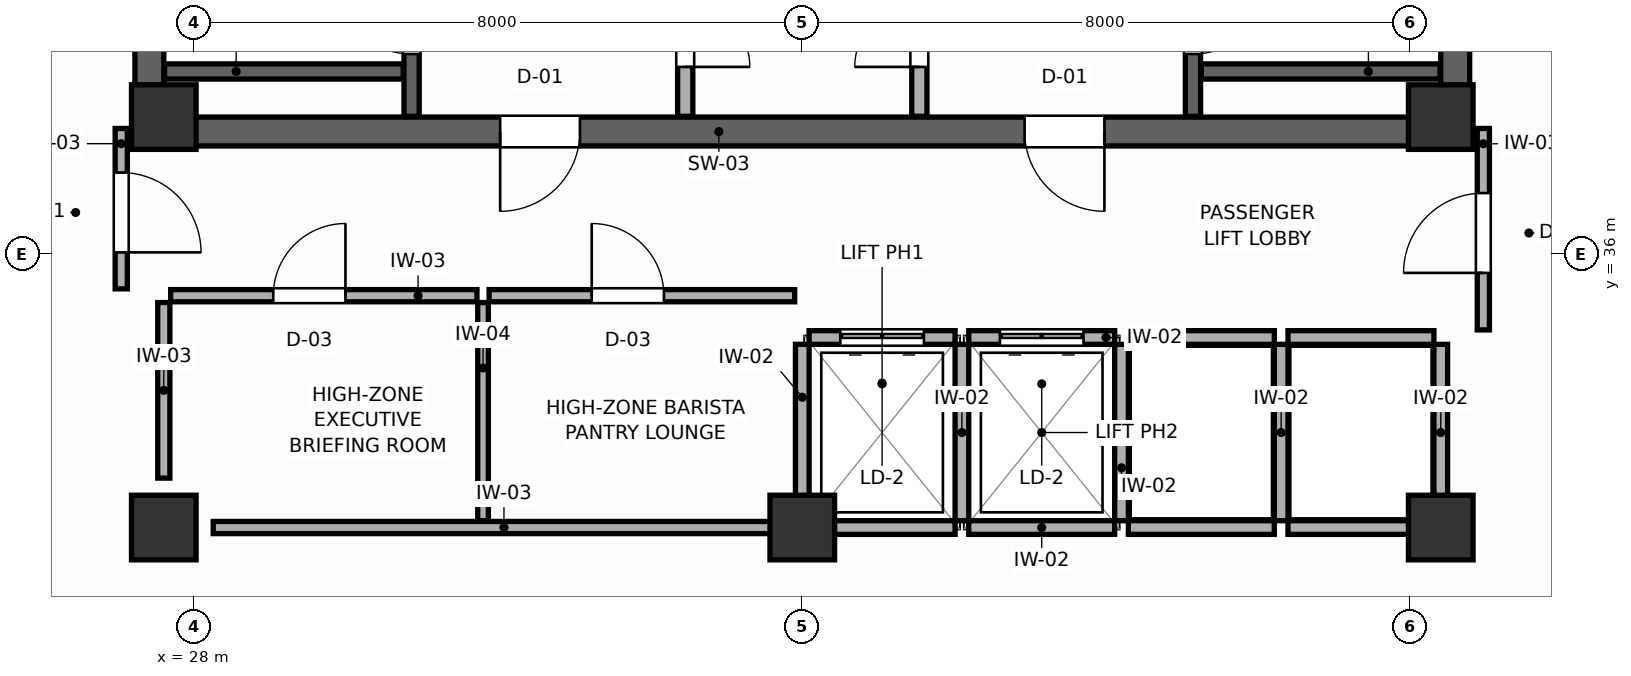
"""IFC4 building model, lengths in metres.
Left out: names, types, materials, properties, quantities, classifications, styles, units other than length and angle.
Written with IfcOpenShell. Run it as: python <this file> out.ifc"""

import sys

from ifc_helpers import new_model, si_unit, direction, frame, frame_2d, origin, origin_2d, place, context, subcontext, project, spatial, rectangle, extrude, source, transform, mapped, element, fill, save


model = new_model("IFC4")
c1 = context("Model", 3, precision=1e-05, world=origin(), true_north=direction((0.0, 1.0)))
c2 = subcontext(c1, "Body", "Model", "MODEL_VIEW")
j1 = project(units=[si_unit("LENGTHUNIT", "METRE"), si_unit("PLANEANGLEUNIT", "RADIAN")], contexts=[c1])
p1 = place(None, origin())
s1 = spatial("IfcSite", under=j1, at=p1, CompositionType="ELEMENT")
p2 = place(p1, origin())
s2 = spatial("IfcBuilding", under=s1, at=p2, CompositionType="ELEMENT")
p3 = place(p2, frame((0.0, 0.0, 243.0)))
s3 = spatial("IfcBuildingStorey", under=s2, at=p3, CompositionType="ELEMENT", Elevation=243.0)
p4 = place(p3, frame((27.22, 37.61, 0.0), z_axis=(0.0, 0.0, 1.0), x_axis=(1.0, 0.0, 0.0)))
e1 = element("IfcWall", 1, at=p4, inside=s3, PredefinedType="SHEAR", context=c2, shape_type="SweptSolid", body=[
    extrude(rectangle(XDim=17.56, YDim=0.38, at=frame_2d((8.78, 0.0))), origin(), (0.0, 0.0, 1.0), 3.6),
])
p5 = place(p4, frame((4.805, 0.0, 0.0)))
e2 = element("IfcOpeningElement", 2, at=p5, cuts=e1, PredefinedType="OPENING", context=c2, shape_type="SweptSolid", body=[
    extrude(rectangle(XDim=1.05, YDim=2.1, at=frame_2d((0.525, 1.05))), frame((0.0, 0.2, 0.0), z_axis=(0.0, -1.0, 0.0), x_axis=(1.0, 0.0, 0.0)), (0.0, 0.0, 1.0), 0.4),
])
p6 = place(p4, frame((11.705, 0.0, 0.0)))
e3 = element("IfcOpeningElement", 3, at=p6, cuts=e1, PredefinedType="OPENING", context=c2, shape_type="SweptSolid", body=[
    extrude(rectangle(XDim=1.05, YDim=2.1, at=frame_2d((0.525, 1.05))), frame((0.0, 0.2, 0.0), z_axis=(0.0, -1.0, 0.0), x_axis=(1.0, 0.0, 0.0)), (0.0, 0.0, 1.0), 0.4),
])
for number, where, z_axis, x_axis in (
    (4, (27.41, 37.8, 0.0), (0.0, 0.0, 1.0), (0.0, 1.0, 0.0)),
    (5, (44.59, 37.8, 0.0), (0.0, 0.0, 1.0), (0.0, 1.0, 0.0)),
):
    element("IfcWall", number, at=place(p3, frame(where, z_axis=z_axis, x_axis=x_axis)), inside=s3, PredefinedType="SHEAR", context=c2, shape_type="SweptSolid", body=[
        extrude(rectangle(XDim=9.0, YDim=0.38, at=frame_2d((4.5, 0.0))), origin(), (0.0, 0.0, 1.0), 3.6),
    ])
m1 = source(origin(), c2, "Body", "SweptSolid", [
    extrude(rectangle(XDim=0.85, YDim=0.85, at=origin_2d()), origin(), (0.0, 0.0, 1.0), 3.6),
])
for number, where, z_axis, x_axis in (
    (6, (27.6, 37.8, 0.0), (0.0, 0.0, 1.0), (1.0, 0.0, 0.0)),
    (7, (44.4, 37.8, 0.0), (0.0, 0.0, 1.0), (1.0, 0.0, 0.0)),
    (8, (27.6, 32.4, 0.0), (0.0, 0.0, 1.0), (1.0, 0.0, 0.0)),
    (9, (44.4, 32.4, 0.0), (0.0, 0.0, 1.0), (1.0, 0.0, 0.0)),
    (10, (36.0, 32.4, 0.0), (0.0, 0.0, 1.0), (1.0, 0.0, 0.0)),
):
    element("IfcColumn", number, at=place(p3, frame(where, z_axis=z_axis, x_axis=x_axis)), inside=s3, PredefinedType="COLUMN", context=c2, shape_type="MappedRepresentation", body=[
        mapped(m1, transform((0.0, 0.0, 0.0), scale=1.0)),
    ])
p7 = place(p3, frame((30.86, 37.81, 0.0), z_axis=(0.0, 0.0, 1.0), x_axis=(0.0, 1.0, 0.0)))
e11 = element("IfcWall", 11, at=p7, inside=s3, PredefinedType="SHEAR", context=c2, shape_type="SweptSolid", body=[
    extrude(rectangle(XDim=8.98, YDim=0.2, at=frame_2d((4.49, 0.0))), origin(), (0.0, 0.0, 1.0), 3.6),
])
p8 = place(p7, frame((0.82, 0.0, 0.0)))
e12 = element("IfcOpeningElement", 12, at=p8, cuts=e11, PredefinedType="OPENING", context=c2, shape_type="SweptSolid", body=[
    extrude(rectangle(XDim=1.05, YDim=2.1, at=frame_2d((0.525, 1.05))), frame((0.0, 0.11, 0.0), z_axis=(0.0, -1.0, 0.0), x_axis=(1.0, 0.0, 0.0)), (0.0, 0.0, 1.0), 0.22),
])
p9 = place(p3, frame((27.61, 38.4, 0.0), z_axis=(0.0, 0.0, 1.0), x_axis=(1.0, 0.0, 0.0)))
e13 = element("IfcWall", 13, at=p9, inside=s3, PredefinedType="SHEAR", context=c2, shape_type="SweptSolid", body=[
    extrude(rectangle(XDim=3.14, YDim=0.2, at=frame_2d((1.57, 0.0))), origin(), (0.0, 0.0, 1.0), 3.6),
])
p10 = place(p3, frame((41.14, 37.81, 0.0), z_axis=(0.0, 0.0, 1.0), x_axis=(0.0, 1.0, 0.0)))
e14 = element("IfcWall", 14, at=p10, inside=s3, PredefinedType="SHEAR", context=c2, shape_type="SweptSolid", body=[
    extrude(rectangle(XDim=8.98, YDim=0.2, at=frame_2d((4.49, 0.0))), origin(), (0.0, 0.0, 1.0), 3.6),
])
p11 = place(p10, frame((0.82, 0.0, 0.0)))
e15 = element("IfcOpeningElement", 15, at=p11, cuts=e14, PredefinedType="OPENING", context=c2, shape_type="SweptSolid", body=[
    extrude(rectangle(XDim=1.05, YDim=2.1, at=frame_2d((0.525, 1.05))), frame((0.0, 0.11, 0.0), z_axis=(0.0, -1.0, 0.0), x_axis=(1.0, 0.0, 0.0)), (0.0, 0.0, 1.0), 0.22),
])
p12 = place(p3, frame((41.25, 38.4, 0.0), z_axis=(0.0, 0.0, 1.0), x_axis=(1.0, 0.0, 0.0)))
e16 = element("IfcWall", 16, at=p12, inside=s3, PredefinedType="SHEAR", context=c2, shape_type="SweptSolid", body=[
    extrude(rectangle(XDim=3.14, YDim=0.2, at=frame_2d((1.57, 0.0))), origin(), (0.0, 0.0, 1.0), 3.6),
])
p13 = place(p3, frame((34.46, 37.81, 0.0), z_axis=(0.0, 0.0, 1.0), x_axis=(0.0, 1.0, 0.0)))
e17 = element("IfcWall", 17, at=p13, inside=s3, PredefinedType="PARTITIONING", context=c2, shape_type="SweptSolid", body=[
    extrude(rectangle(XDim=8.98, YDim=0.2, at=frame_2d((4.49, 0.0))), origin(), (0.0, 0.0, 1.0), 3.41),
])
p14 = place(p13, frame((0.65, 0.0, 0.0)))
e18 = element("IfcOpeningElement", 18, at=p14, cuts=e17, PredefinedType="OPENING", context=c2, shape_type="SweptSolid", body=[
    extrude(rectangle(XDim=0.85, YDim=2.05, at=frame_2d((0.425, 1.025))), frame((0.0, 0.11, 0.0), z_axis=(0.0, -1.0, 0.0), x_axis=(1.0, 0.0, 0.0)), (0.0, 0.0, 1.0), 0.22),
])
p15 = place(p3, frame((37.54, 37.81, 0.0), z_axis=(0.0, 0.0, 1.0), x_axis=(0.0, 1.0, 0.0)))
e19 = element("IfcWall", 19, at=p15, inside=s3, PredefinedType="PARTITIONING", context=c2, shape_type="SweptSolid", body=[
    extrude(rectangle(XDim=8.98, YDim=0.2, at=frame_2d((4.49, 0.0))), origin(), (0.0, 0.0, 1.0), 3.41),
])
p16 = place(p15, frame((0.65, 0.0, 0.0)))
e20 = element("IfcOpeningElement", 20, at=p16, cuts=e19, PredefinedType="OPENING", context=c2, shape_type="SweptSolid", body=[
    extrude(rectangle(XDim=0.85, YDim=2.05, at=frame_2d((0.425, 1.025))), frame((0.0, 0.11, 0.0), z_axis=(0.0, -1.0, 0.0), x_axis=(1.0, 0.0, 0.0)), (0.0, 0.0, 1.0), 0.22),
])
p17 = place(p3, frame((36.09, 34.9, 0.0), z_axis=(0.0, 0.0, 1.0), x_axis=(1.0, 0.0, 0.0)))
e21 = element("IfcWall", 21, at=p17, inside=s3, PredefinedType="PARTITIONING", context=c2, shape_type="SweptSolid", body=[
    extrude(rectangle(XDim=1.92, YDim=0.18, at=frame_2d((0.96, 0.0))), origin(), (0.0, 0.0, 1.0), 3.41),
])
p18 = place(p17, frame((0.41, 0.0, 0.0)))
e22 = element("IfcOpeningElement", 22, at=p18, cuts=e21, PredefinedType="OPENING", context=c2, shape_type="SweptSolid", body=[
    extrude(rectangle(XDim=1.1, YDim=2.1, at=frame_2d((0.55, 1.05))), frame((0.0, 0.1, 0.0), z_axis=(0.0, -1.0, 0.0), x_axis=(1.0, 0.0, 0.0)), (0.0, 0.0, 1.0), 0.2),
])
p19 = place(p3, frame((36.09, 32.4, 0.0), z_axis=(0.0, 0.0, 1.0), x_axis=(1.0, 0.0, 0.0)))
e23 = element("IfcWall", 23, at=p19, inside=s3, PredefinedType="PARTITIONING", context=c2, shape_type="SweptSolid", body=[
    extrude(rectangle(XDim=1.92, YDim=0.18, at=frame_2d((0.96, 0.0))), origin(), (0.0, 0.0, 1.0), 3.08),
])
p20 = place(p3, frame((36.0, 32.49, 0.0), z_axis=(0.0, 0.0, 1.0), x_axis=(0.0, 1.0, 0.0)))
e24 = element("IfcWall", 24, at=p20, inside=s3, PredefinedType="PARTITIONING", context=c2, shape_type="SweptSolid", body=[
    extrude(rectangle(XDim=2.32, YDim=0.18, at=frame_2d((1.16, 0.0))), origin(), (0.0, 0.0, 1.0), 3.41),
])
p21 = place(p3, frame((38.19, 34.9, 0.0), z_axis=(0.0, 0.0, 1.0), x_axis=(1.0, 0.0, 0.0)))
e25 = element("IfcWall", 25, at=p21, inside=s3, PredefinedType="PARTITIONING", context=c2, shape_type="SweptSolid", body=[
    extrude(rectangle(XDim=1.92, YDim=0.18, at=frame_2d((0.96, 0.0))), origin(), (0.0, 0.0, 1.0), 3.41),
])
p22 = place(p21, frame((0.41, 0.0, 0.0)))
e26 = element("IfcOpeningElement", 26, at=p22, cuts=e25, PredefinedType="OPENING", context=c2, shape_type="SweptSolid", body=[
    extrude(rectangle(XDim=1.1, YDim=2.1, at=frame_2d((0.55, 1.05))), frame((0.0, 0.1, 0.0), z_axis=(0.0, -1.0, 0.0), x_axis=(1.0, 0.0, 0.0)), (0.0, 0.0, 1.0), 0.2),
])
p23 = place(p3, frame((38.19, 32.4, 0.0), z_axis=(0.0, 0.0, 1.0), x_axis=(1.0, 0.0, 0.0)))
e27 = element("IfcWall", 27, at=p23, inside=s3, PredefinedType="PARTITIONING", context=c2, shape_type="SweptSolid", body=[
    extrude(rectangle(XDim=1.92, YDim=0.18, at=frame_2d((0.96, 0.0))), origin(), (0.0, 0.0, 1.0), 3.08),
])
p24 = place(p3, frame((38.1, 32.49, 0.0), z_axis=(0.0, 0.0, 1.0), x_axis=(0.0, 1.0, 0.0)))
e28 = element("IfcWall", 28, at=p24, inside=s3, PredefinedType="PARTITIONING", context=c2, shape_type="SweptSolid", body=[
    extrude(rectangle(XDim=2.32, YDim=0.18, at=frame_2d((1.16, 0.0))), origin(), (0.0, 0.0, 1.0), 3.41),
])
p25 = place(p3, frame((40.29, 34.9, 0.0), z_axis=(0.0, 0.0, 1.0), x_axis=(1.0, 0.0, 0.0)))
e29 = element("IfcWall", 29, at=p25, inside=s3, PredefinedType="PARTITIONING", context=c2, shape_type="SweptSolid", body=[
    extrude(rectangle(XDim=1.92, YDim=0.18, at=frame_2d((0.96, 0.0))), origin(), (0.0, 0.0, 1.0), 3.41),
])
p26 = place(p3, frame((40.29, 32.4, 0.0), z_axis=(0.0, 0.0, 1.0), x_axis=(1.0, 0.0, 0.0)))
e30 = element("IfcWall", 30, at=p26, inside=s3, PredefinedType="PARTITIONING", context=c2, shape_type="SweptSolid", body=[
    extrude(rectangle(XDim=1.92, YDim=0.18, at=frame_2d((0.96, 0.0))), origin(), (0.0, 0.0, 1.0), 3.08),
])
p27 = place(p3, frame((40.2, 32.49, 0.0), z_axis=(0.0, 0.0, 1.0), x_axis=(0.0, 1.0, 0.0)))
e31 = element("IfcWall", 31, at=p27, inside=s3, PredefinedType="PARTITIONING", context=c2, shape_type="SweptSolid", body=[
    extrude(rectangle(XDim=2.32, YDim=0.18, at=frame_2d((1.16, 0.0))), origin(), (0.0, 0.0, 1.0), 3.41),
])
p28 = place(p3, frame((42.39, 34.9, 0.0), z_axis=(0.0, 0.0, 1.0), x_axis=(1.0, 0.0, 0.0)))
e32 = element("IfcWall", 32, at=p28, inside=s3, PredefinedType="PARTITIONING", context=c2, shape_type="SweptSolid", body=[
    extrude(rectangle(XDim=1.92, YDim=0.18, at=frame_2d((0.96, 0.0))), origin(), (0.0, 0.0, 1.0), 3.41),
])
p29 = place(p3, frame((42.39, 32.4, 0.0), z_axis=(0.0, 0.0, 1.0), x_axis=(1.0, 0.0, 0.0)))
e33 = element("IfcWall", 33, at=p29, inside=s3, PredefinedType="PARTITIONING", context=c2, shape_type="SweptSolid", body=[
    extrude(rectangle(XDim=1.92, YDim=0.18, at=frame_2d((0.96, 0.0))), origin(), (0.0, 0.0, 1.0), 3.08),
])
for number, where, z_axis, x_axis in (
    (34, (42.3, 32.49, 0.0), (0.0, 0.0, 1.0), (0.0, 1.0, 0.0)),
    (35, (44.4, 32.49, 0.0), (0.0, 0.0, 1.0), (0.0, 1.0, 0.0)),
):
    element("IfcWall", number, at=place(p3, frame(where, z_axis=z_axis, x_axis=x_axis)), inside=s3, PredefinedType="PARTITIONING", context=c2, shape_type="SweptSolid", body=[
        extrude(rectangle(XDim=2.32, YDim=0.18, at=frame_2d((1.16, 0.0))), origin(), (0.0, 0.0, 1.0), 3.41),
    ])
p30 = place(p3, frame((28.25, 32.4, 0.0), z_axis=(0.0, 0.0, 1.0), x_axis=(1.0, 0.0, 0.0)))
e36 = element("IfcWall", 36, at=p30, inside=s3, PredefinedType="PARTITIONING", context=c2, shape_type="SweptSolid", body=[
    extrude(rectangle(XDim=7.65, YDim=0.16, at=frame_2d((3.825, 0.0))), origin(), (0.0, 0.0, 1.0), 3.08),
])
p31 = place(p3, frame((27.6, 33.05, 0.0), z_axis=(0.0, 0.0, 1.0), x_axis=(0.0, 1.0, 0.0)))
e37 = element("IfcWall", 37, at=p31, inside=s3, PredefinedType="PARTITIONING", context=c2, shape_type="SweptSolid", body=[
    extrude(rectangle(XDim=2.31, YDim=0.16, at=frame_2d((1.155, 0.0))), origin(), (0.0, 0.0, 1.0), 3.41),
])
p32 = place(p3, frame((31.8, 32.49, 0.0), z_axis=(0.0, 0.0, 1.0), x_axis=(0.0, 1.0, 0.0)))
e38 = element("IfcWall", 38, at=p32, inside=s3, PredefinedType="PARTITIONING", context=c2, shape_type="SweptSolid", body=[
    extrude(rectangle(XDim=2.87, YDim=0.14, at=frame_2d((1.435, 0.0))), origin(), (0.0, 0.0, 1.0), 3.41),
])
p33 = place(p3, frame((27.69, 35.45, 0.0), z_axis=(0.0, 0.0, 1.0), x_axis=(1.0, 0.0, 0.0)))
e39 = element("IfcWall", 39, at=p33, inside=s3, PredefinedType="PARTITIONING", context=c2, shape_type="SweptSolid", body=[
    extrude(rectangle(XDim=4.03, YDim=0.16, at=frame_2d((2.015, 0.0))), origin(), (0.0, 0.0, 1.0), 3.41),
])
p34 = place(p33, frame((1.35, 0.0, 0.0)))
e40 = element("IfcOpeningElement", 40, at=p34, cuts=e39, PredefinedType="OPENING", context=c2, shape_type="SweptSolid", body=[
    extrude(rectangle(XDim=0.95, YDim=2.05, at=frame_2d((0.475, 1.025))), frame((0.0, 0.09, 0.0), z_axis=(0.0, -1.0, 0.0), x_axis=(1.0, 0.0, 0.0)), (0.0, 0.0, 1.0), 0.18),
])
p35 = place(p3, frame((31.88, 35.45, 0.0), z_axis=(0.0, 0.0, 1.0), x_axis=(1.0, 0.0, 0.0)))
e41 = element("IfcWall", 41, at=p35, inside=s3, PredefinedType="PARTITIONING", context=c2, shape_type="SweptSolid", body=[
    extrude(rectangle(XDim=4.02, YDim=0.16, at=frame_2d((2.01, 0.0))), origin(), (0.0, 0.0, 1.0), 3.41),
])
p36 = place(p35, frame((1.35, 0.0, 0.0)))
e42 = element("IfcOpeningElement", 42, at=p36, cuts=e41, PredefinedType="OPENING", context=c2, shape_type="SweptSolid", body=[
    extrude(rectangle(XDim=0.95, YDim=2.05, at=frame_2d((0.475, 1.025))), frame((0.0, 0.09, 0.0), z_axis=(0.0, -1.0, 0.0), x_axis=(1.0, 0.0, 0.0)), (0.0, 0.0, 1.0), 0.18),
])
p37 = place(p3, frame((27.04, 35.54, 0.0), z_axis=(0.0, 0.0, 1.0), x_axis=(0.0, 1.0, 0.0)))
e43 = element("IfcWall", 43, at=p37, inside=s3, PredefinedType="PARTITIONING", context=c2, shape_type="SweptSolid", body=[
    extrude(rectangle(XDim=2.11, YDim=0.16, at=frame_2d((1.055, 0.0))), origin(), (0.0, 0.0, 1.0), 3.41),
])
p38 = place(p37, frame((0.48, 0.0, 0.0)))
e44 = element("IfcOpeningElement", 44, at=p38, cuts=e43, PredefinedType="OPENING", context=c2, shape_type="SweptSolid", body=[
    extrude(rectangle(XDim=1.05, YDim=2.1, at=frame_2d((0.525, 1.05))), frame((0.0, 0.09, 0.0), z_axis=(0.0, -1.0, 0.0), x_axis=(1.0, 0.0, 0.0)), (0.0, 0.0, 1.0), 0.18),
])
p39 = place(p3, frame((44.96, 35.0, 0.0), z_axis=(0.0, 0.0, 1.0), x_axis=(0.0, 1.0, 0.0)))
e45 = element("IfcWall", 45, at=p39, inside=s3, PredefinedType="PARTITIONING", context=c2, shape_type="SweptSolid", body=[
    extrude(rectangle(XDim=2.65, YDim=0.16, at=frame_2d((1.325, 0.0))), origin(), (0.0, 0.0, 1.0), 3.41),
])
p40 = place(p39, frame((0.75, 0.0, 0.0)))
e46 = element("IfcOpeningElement", 46, at=p40, cuts=e45, PredefinedType="OPENING", context=c2, shape_type="SweptSolid", body=[
    extrude(rectangle(XDim=1.05, YDim=2.1, at=frame_2d((0.525, 1.05))), frame((0.0, 0.09, 0.0), z_axis=(0.0, -1.0, 0.0), x_axis=(1.0, 0.0, 0.0)), (0.0, 0.0, 1.0), 0.18),
])
p41 = place(p8, origin())
e47 = element("IfcDoor", 47, at=p41, inside=s3, OperationType="SINGLE_SWING_RIGHT", PredefinedType="DOOR", context=c2, shape_type="SweptSolid", body=[
    extrude(rectangle(XDim=1.05, YDim=2.1, at=frame_2d((0.525, 1.05))), frame((0.0, 0.025, 0.0), z_axis=(0.0, -1.0, 0.0), x_axis=(1.0, 0.0, 0.0)), (0.0, 0.0, 1.0), 0.05),
])
fill(e12, e47)
p42 = place(p11, frame((1.05, 0.0, 0.0), z_axis=(0.0, 0.0, 1.0), x_axis=(-1.0, 0.0, 0.0)))
e48 = element("IfcDoor", 48, at=p42, inside=s3, OperationType="SINGLE_SWING_LEFT", PredefinedType="DOOR", context=c2, shape_type="SweptSolid", body=[
    extrude(rectangle(XDim=1.05, YDim=2.1, at=frame_2d((0.525, 1.05))), frame((0.0, 0.025, 0.0), z_axis=(0.0, -1.0, 0.0), x_axis=(1.0, 0.0, 0.0)), (0.0, 0.0, 1.0), 0.05),
])
fill(e15, e48)
p43 = place(p14, frame((0.85, 0.0, 0.0), z_axis=(0.0, 0.0, 1.0), x_axis=(-1.0, 0.0, 0.0)))
e49 = element("IfcDoor", 49, at=p43, inside=s3, OperationType="SINGLE_SWING_RIGHT", PredefinedType="DOOR", context=c2, shape_type="SweptSolid", body=[
    extrude(rectangle(XDim=0.85, YDim=2.05, at=frame_2d((0.425, 1.025))), frame((0.0, 0.025, 0.0), z_axis=(0.0, -1.0, 0.0), x_axis=(1.0, 0.0, 0.0)), (0.0, 0.0, 1.0), 0.05),
])
fill(e18, e49)
p44 = place(p16, origin())
e50 = element("IfcDoor", 50, at=p44, inside=s3, OperationType="SINGLE_SWING_LEFT", PredefinedType="DOOR", context=c2, shape_type="SweptSolid", body=[
    extrude(rectangle(XDim=0.85, YDim=2.05, at=frame_2d((0.425, 1.025))), frame((0.0, 0.025, 0.0), z_axis=(0.0, -1.0, 0.0), x_axis=(1.0, 0.0, 0.0)), (0.0, 0.0, 1.0), 0.05),
])
fill(e20, e50)
p45 = place(p18, origin())
e51 = element("IfcDoor", 51, at=p45, inside=s3, OperationType="DOUBLE_DOOR_SLIDING", PredefinedType="DOOR", context=c2, shape_type="SweptSolid", body=[
    extrude(rectangle(XDim=1.1, YDim=2.1, at=frame_2d((0.55, 1.05))), frame((0.0, 0.025, 0.0), z_axis=(0.0, -1.0, 0.0), x_axis=(1.0, 0.0, 0.0)), (0.0, 0.0, 1.0), 0.05),
])
fill(e22, e51)
p46 = place(p22, origin())
e52 = element("IfcDoor", 52, at=p46, inside=s3, OperationType="DOUBLE_DOOR_SLIDING", PredefinedType="DOOR", context=c2, shape_type="SweptSolid", body=[
    extrude(rectangle(XDim=1.1, YDim=2.1, at=frame_2d((0.55, 1.05))), frame((0.0, 0.025, 0.0), z_axis=(0.0, -1.0, 0.0), x_axis=(1.0, 0.0, 0.0)), (0.0, 0.0, 1.0), 0.05),
])
fill(e26, e52)
p47 = place(p34, origin())
e53 = element("IfcDoor", 53, at=p47, inside=s3, OperationType="SINGLE_SWING_RIGHT", PredefinedType="DOOR", context=c2, shape_type="SweptSolid", body=[
    extrude(rectangle(XDim=0.95, YDim=2.05, at=frame_2d((0.475, 1.025))), frame((0.0, 0.025, 0.0), z_axis=(0.0, -1.0, 0.0), x_axis=(1.0, 0.0, 0.0)), (0.0, 0.0, 1.0), 0.05),
])
fill(e40, e53)
p48 = place(p36, origin())
e54 = element("IfcDoor", 54, at=p48, inside=s3, OperationType="SINGLE_SWING_LEFT", PredefinedType="DOOR", context=c2, shape_type="SweptSolid", body=[
    extrude(rectangle(XDim=0.95, YDim=2.05, at=frame_2d((0.475, 1.025))), frame((0.0, 0.025, 0.0), z_axis=(0.0, -1.0, 0.0), x_axis=(1.0, 0.0, 0.0)), (0.0, 0.0, 1.0), 0.05),
])
fill(e42, e54)
p49 = place(p38, frame((1.05, 0.0, 0.0), z_axis=(0.0, 0.0, 1.0), x_axis=(-1.0, 0.0, 0.0)))
e55 = element("IfcDoor", 55, at=p49, inside=s3, OperationType="SINGLE_SWING_RIGHT", PredefinedType="DOOR", context=c2, shape_type="SweptSolid", body=[
    extrude(rectangle(XDim=1.05, YDim=2.1, at=frame_2d((0.525, 1.05))), frame((0.0, 0.025, 0.0), z_axis=(0.0, -1.0, 0.0), x_axis=(1.0, 0.0, 0.0)), (0.0, 0.0, 1.0), 0.05),
])
fill(e44, e55)
p50 = place(p40, origin())
e56 = element("IfcDoor", 56, at=p50, inside=s3, OperationType="SINGLE_SWING_LEFT", PredefinedType="DOOR", context=c2, shape_type="SweptSolid", body=[
    extrude(rectangle(XDim=1.05, YDim=2.1, at=frame_2d((0.525, 1.05))), frame((0.0, 0.025, 0.0), z_axis=(0.0, -1.0, 0.0), x_axis=(1.0, 0.0, 0.0)), (0.0, 0.0, 1.0), 0.05),
])
fill(e46, e56)
p51 = place(p5, frame((1.05, 0.0, 0.0), z_axis=(0.0, 0.0, 1.0), x_axis=(-1.0, 0.0, 0.0)))
e57 = element("IfcDoor", 57, at=p51, inside=s3, OperationType="SINGLE_SWING_RIGHT", PredefinedType="DOOR", context=c2, shape_type="SweptSolid", body=[
    extrude(rectangle(XDim=1.05, YDim=2.1, at=frame_2d((0.525, 1.05))), frame((0.0, 0.025, 0.0), z_axis=(0.0, -1.0, 0.0), x_axis=(1.0, 0.0, 0.0)), (0.0, 0.0, 1.0), 0.05),
])
fill(e2, e57)
p52 = place(p6, frame((1.05, 0.0, 0.0), z_axis=(0.0, 0.0, 1.0), x_axis=(-1.0, 0.0, 0.0)))
e58 = element("IfcDoor", 58, at=p52, inside=s3, OperationType="SINGLE_SWING_LEFT", PredefinedType="DOOR", context=c2, shape_type="SweptSolid", body=[
    extrude(rectangle(XDim=1.05, YDim=2.1, at=frame_2d((0.525, 1.05))), frame((0.0, 0.025, 0.0), z_axis=(0.0, -1.0, 0.0), x_axis=(1.0, 0.0, 0.0)), (0.0, 0.0, 1.0), 0.05),
])
fill(e3, e58)
save(model, sys.argv[1])
